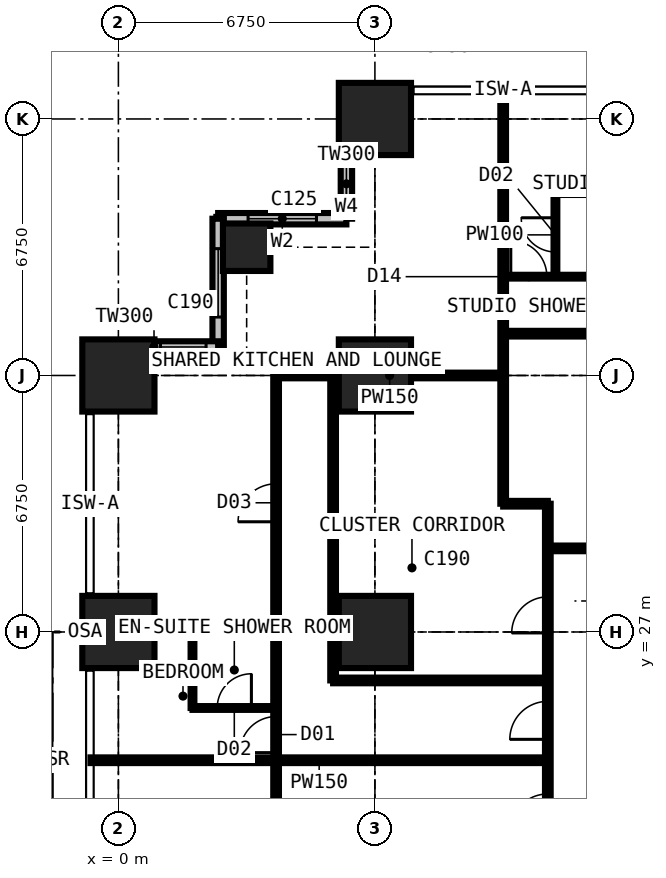
"""IFC4 building model, lengths in metres.
Left out: names, types, materials, properties, quantities, classifications, styles, units other than length and angle.
Written with IfcOpenShell. Run it as: python <this file> out.ifc"""

import sys

from ifc_helpers import new_model, si_unit, direction, frame, frame_2d, origin, origin_2d, place, context, subcontext, project, spatial, rectangle, extrude, element, fill, save


model = new_model("IFC4")
c1 = context("Model", 3, precision=1e-05, world=origin(), true_north=direction((0.0, 1.0)))
c2 = subcontext(c1, "Body", "Model", "MODEL_VIEW")
j1 = project(units=[si_unit("LENGTHUNIT", "METRE"), si_unit("PLANEANGLEUNIT", "RADIAN")], contexts=[c1])
p1 = place(None, origin())
s1 = spatial("IfcSite", under=j1, at=p1, CompositionType="ELEMENT")
p2 = place(p1, origin())
s2 = spatial("IfcBuilding", under=s1, at=p2, CompositionType="ELEMENT")
p3 = place(p2, frame((0.0, 0.0, 32.4)))
s3 = spatial("IfcBuildingStorey", under=s2, at=p3, CompositionType="ELEMENT", Elevation=32.4)
for number, where, z_axis, x_axis in (
    (1, (0.0, 27.0, 0.0), (0.0, 0.0, 1.0), (1.0, 0.0, 0.0)),
    (2, (0.0, 33.75, 0.0), (0.0, 0.0, 1.0), (1.0, 0.0, 0.0)),
):
    element("IfcColumn", number, at=place(p3, frame(where, z_axis=z_axis, x_axis=x_axis)), inside=s3, PredefinedType="COLUMN", context=c2, shape_type="SweptSolid", body=[
        extrude(rectangle(XDim=1.9, YDim=1.9, at=origin_2d()), origin(), (0.0, 0.0, 1.0), 3.6),
    ])
p4 = place(p3, frame((3.375, 37.125, 0.0), z_axis=(0.0, 0.0, 1.0), x_axis=(1.0, 0.0, 0.0)))
e3 = element("IfcColumn", 3, at=p4, inside=s3, PredefinedType="COLUMN", context=c2, shape_type="SweptSolid", body=[
    extrude(rectangle(XDim=1.25, YDim=1.25, at=origin_2d()), origin(), (0.0, 0.0, 1.0), 3.6),
])
for number, where, z_axis, x_axis in (
    (4, (6.75, 27.0, 0.0), (0.0, 0.0, 1.0), (1.0, 0.0, 0.0)),
    (5, (6.75, 33.75, 0.0), (0.0, 0.0, 1.0), (1.0, 0.0, 0.0)),
    (6, (6.75, 40.5, 0.0), (0.0, 0.0, 1.0), (1.0, 0.0, 0.0)),
):
    element("IfcColumn", number, at=place(p3, frame(where, z_axis=z_axis, x_axis=x_axis)), inside=s3, PredefinedType="COLUMN", context=c2, shape_type="SweptSolid", body=[
        extrude(rectangle(XDim=1.9, YDim=1.9, at=origin_2d()), origin(), (0.0, 0.0, 1.0), 3.6),
    ])
p5 = place(p3, frame((6.0, 41.25, 0.0), z_axis=(0.0, 0.0, 1.0), x_axis=(0.0, -1.0, 0.0)))
e7 = element("IfcWall", 7, at=p5, inside=s3, PredefinedType="SOLIDWALL", context=c2, shape_type="SweptSolid", body=[
    extrude(rectangle(XDim=3.375, YDim=0.3, at=frame_2d((1.688, 0.0))), origin(), (0.0, 0.0, 1.0), 3.375),
])
p6 = place(p5, frame((1.857, 0.0, 0.9)))
e8 = element("IfcOpeningElement", 8, at=p6, cuts=e7, PredefinedType="OPENING", context=c2, shape_type="SweptSolid", body=[
    extrude(rectangle(XDim=1.2, YDim=1.8, at=frame_2d((0.6, 0.9))), frame((0.0, 0.16, 0.0), z_axis=(0.0, -1.0, 0.0), x_axis=(1.0, 0.0, 0.0)), (0.0, 0.0, 1.0), 0.32),
])
p7 = place(p3, frame((6.0, 37.875, 0.0), z_axis=(0.0, 0.0, 1.0), x_axis=(-1.0, 0.0, 0.0)))
e9 = element("IfcWall", 9, at=p7, inside=s3, PredefinedType="SOLIDWALL", context=c2, shape_type="SweptSolid", body=[
    extrude(rectangle(XDim=3.375, YDim=0.3, at=frame_2d((1.688, 0.0))), origin(), (0.0, 0.0, 1.0), 3.375),
])
p8 = place(p7, frame((0.788, 0.0, 0.6)))
e10 = element("IfcOpeningElement", 10, at=p8, cuts=e9, PredefinedType="OPENING", context=c2, shape_type="SweptSolid", body=[
    extrude(rectangle(XDim=1.8, YDim=2.1, at=frame_2d((0.9, 1.05))), frame((0.0, 0.16, 0.0), z_axis=(0.0, -1.0, 0.0), x_axis=(1.0, 0.0, 0.0)), (0.0, 0.0, 1.0), 0.32),
])
p9 = place(p3, frame((2.625, 37.875, 0.0), z_axis=(0.0, 0.0, 1.0), x_axis=(0.0, -1.0, 0.0)))
e11 = element("IfcWall", 11, at=p9, inside=s3, PredefinedType="SOLIDWALL", context=c2, shape_type="SweptSolid", body=[
    extrude(rectangle(XDim=3.375, YDim=0.3, at=frame_2d((1.688, 0.0))), origin(), (0.0, 0.0, 1.0), 3.375),
])
p10 = place(p9, frame((0.788, 0.0, 0.6)))
e12 = element("IfcOpeningElement", 12, at=p10, cuts=e11, PredefinedType="OPENING", context=c2, shape_type="SweptSolid", body=[
    extrude(rectangle(XDim=1.8, YDim=2.1, at=frame_2d((0.9, 1.05))), frame((0.0, 0.16, 0.0), z_axis=(0.0, -1.0, 0.0), x_axis=(1.0, 0.0, 0.0)), (0.0, 0.0, 1.0), 0.32),
])
p11 = place(p3, frame((2.625, 34.5, 0.0), z_axis=(0.0, 0.0, 1.0), x_axis=(-1.0, 0.0, 0.0)))
e13 = element("IfcWall", 13, at=p11, inside=s3, PredefinedType="SOLIDWALL", context=c2, shape_type="SweptSolid", body=[
    extrude(rectangle(XDim=3.375, YDim=0.3, at=frame_2d((1.688, 0.0))), origin(), (0.0, 0.0, 1.0), 3.375),
])
p12 = place(p11, frame((0.317, 0.0, 0.9)))
e14 = element("IfcOpeningElement", 14, at=p12, cuts=e13, PredefinedType="OPENING", context=c2, shape_type="SweptSolid", body=[
    extrude(rectangle(XDim=1.2, YDim=1.8, at=frame_2d((0.6, 0.9))), frame((0.0, 0.16, 0.0), z_axis=(0.0, -1.0, 0.0), x_axis=(1.0, 0.0, 0.0)), (0.0, 0.0, 1.0), 0.32),
])
p13 = place(p3, frame((-0.734, 23.625, 0.0), z_axis=(0.0, 0.0, 1.0), x_axis=(1.0, 0.0, 0.0)))
e15 = element("IfcWall", 15, at=p13, inside=s3, PredefinedType="PARTITIONING", context=c2, shape_type="SweptSolid", body=[
    extrude(rectangle(XDim=12.034, YDim=0.15, at=frame_2d((6.017, 0.0))), origin(), (0.0, 0.0, 1.0), 3.375),
])
p14 = place(p3, frame((-0.734, 27.0, 0.0), z_axis=(0.0, 0.0, 1.0), x_axis=(1.0, 0.0, 0.0)))
e16 = element("IfcWall", 16, at=p14, inside=s3, PredefinedType="PARTITIONING", context=c2, shape_type="SweptSolid", body=[
    extrude(rectangle(XDim=4.884, YDim=0.15, at=frame_2d((2.442, 0.0))), origin(), (0.0, 0.0, 1.0), 2.61),
])
p15 = place(p3, frame((1.95, 25.0, 0.0), z_axis=(0.0, 0.0, 1.0), x_axis=(0.0, 1.0, 0.0)))
e17 = element("IfcWall", 17, at=p15, inside=s3, PredefinedType="PARTITIONING", context=c2, shape_type="SweptSolid", body=[
    extrude(rectangle(XDim=2.0, YDim=0.1, at=frame_2d((1.0, 0.0))), origin(), (0.0, 0.0, 1.0), 3.375),
])
p16 = place(p3, frame((1.95, 25.0, 0.0), z_axis=(0.0, 0.0, 1.0), x_axis=(1.0, 0.0, 0.0)))
e18 = element("IfcWall", 18, at=p16, inside=s3, PredefinedType="PARTITIONING", context=c2, shape_type="SweptSolid", body=[
    extrude(rectangle(XDim=2.2, YDim=0.1, at=frame_2d((1.1, 0.0))), origin(), (0.0, 0.0, 1.0), 3.375),
])
p17 = place(p16, frame((0.65, 0.0, 0.0)))
e19 = element("IfcOpeningElement", 19, at=p17, cuts=e18, PredefinedType="OPENING", context=c2, shape_type="SweptSolid", body=[
    extrude(rectangle(XDim=0.9, YDim=2.2, at=frame_2d((0.45, 1.1))), frame((0.0, 0.06, 0.0), z_axis=(0.0, -1.0, 0.0), x_axis=(1.0, 0.0, 0.0)), (0.0, 0.0, 1.0), 0.12),
])
p18 = place(p3, frame((4.15, 10.125, 0.0), z_axis=(0.0, 0.0, 1.0), x_axis=(0.0, 1.0, 0.0)))
e20 = element("IfcWall", 20, at=p18, inside=s3, PredefinedType="PARTITIONING", context=c2, shape_type="SweptSolid", body=[
    extrude(rectangle(XDim=23.625, YDim=0.15, at=frame_2d((11.812, 0.0))), origin(), (0.0, 0.0, 1.0), 3.375),
])
p19 = place(p18, frame((19.775, 0.0, 0.0)))
e21 = element("IfcOpeningElement", 21, at=p19, cuts=e20, PredefinedType="OPENING", context=c2, shape_type="SweptSolid", body=[
    extrude(rectangle(XDim=1.0, YDim=2.2, at=frame_2d((0.5, 1.1))), frame((0.0, 0.085, 0.0), z_axis=(0.0, -1.0, 0.0), x_axis=(1.0, 0.0, 0.0)), (0.0, 0.0, 1.0), 0.17),
])
p20 = place(p18, frame((13.7, 0.0, 0.0)))
e22 = element("IfcOpeningElement", 22, at=p20, cuts=e20, PredefinedType="OPENING", context=c2, shape_type="SweptSolid", body=[
    extrude(rectangle(XDim=0.95, YDim=2.2, at=frame_2d((0.475, 1.1))), frame((0.0, 0.085, 0.0), z_axis=(0.0, -1.0, 0.0), x_axis=(1.0, 0.0, 0.0)), (0.0, 0.0, 1.0), 0.17),
])
p21 = place(p18, frame((4.2, 0.0, 0.0)))
e23 = element("IfcOpeningElement", 23, at=p21, cuts=e20, PredefinedType="OPENING", context=c2, shape_type="SweptSolid", body=[
    extrude(rectangle(XDim=0.95, YDim=2.2, at=frame_2d((0.475, 1.1))), frame((0.0, 0.085, 0.0), z_axis=(0.0, -1.0, 0.0), x_axis=(1.0, 0.0, 0.0)), (0.0, 0.0, 1.0), 0.17),
])
p22 = place(p18, frame((10.95, 0.0, 0.0)))
e24 = element("IfcOpeningElement", 24, at=p22, cuts=e20, PredefinedType="OPENING", context=c2, shape_type="SweptSolid", body=[
    extrude(rectangle(XDim=0.95, YDim=2.2, at=frame_2d((0.475, 1.1))), frame((0.0, 0.085, 0.0), z_axis=(0.0, -1.0, 0.0), x_axis=(1.0, 0.0, 0.0)), (0.0, 0.0, 1.0), 0.17),
])
p23 = place(p3, frame((4.15, 33.75, 0.0), z_axis=(0.0, 0.0, 1.0), x_axis=(1.0, 0.0, 0.0)))
e25 = element("IfcWall", 25, at=p23, inside=s3, PredefinedType="PARTITIONING", context=c2, shape_type="SweptSolid", body=[
    extrude(rectangle(XDim=5.975, YDim=0.15, at=frame_2d((2.988, 0.0))), origin(), (0.0, 0.0, 1.0), 2.877),
])
p24 = place(p3, frame((5.65, 25.725, 0.0), z_axis=(0.0, 0.0, 1.0), x_axis=(0.0, 1.0, 0.0)))
e26 = element("IfcWall", 26, at=p24, inside=s3, PredefinedType="PARTITIONING", context=c2, shape_type="SweptSolid", body=[
    extrude(rectangle(XDim=8.025, YDim=0.15, at=frame_2d((4.012, 0.0))), origin(), (0.0, 0.0, 1.0), 3.375),
])
p25 = place(p3, frame((5.65, 25.725, 0.0), z_axis=(0.0, 0.0, 1.0), x_axis=(1.0, 0.0, 0.0)))
e27 = element("IfcWall", 27, at=p25, inside=s3, PredefinedType="PARTITIONING", context=c2, shape_type="SweptSolid", body=[
    extrude(rectangle(XDim=5.65, YDim=0.15, at=frame_2d((2.825, 0.0))), origin(), (0.0, 0.0, 1.0), 3.375),
])
p26 = place(p3, frame((10.125, 30.375, 0.0), z_axis=(0.0, 0.0, 1.0), x_axis=(0.0, 1.0, 0.0)))
e28 = element("IfcWall", 28, at=p26, inside=s3, PredefinedType="PARTITIONING", context=c2, shape_type="SweptSolid", body=[
    extrude(rectangle(XDim=10.859, YDim=0.15, at=frame_2d((5.429, 0.0))), origin(), (0.0, 0.0, 1.0), 3.375),
])
p27 = place(p3, frame((10.125, 30.375, 0.0), z_axis=(0.0, 0.0, 1.0), x_axis=(1.0, 0.0, 0.0)))
e29 = element("IfcWall", 29, at=p27, inside=s3, PredefinedType="PARTITIONING", context=c2, shape_type="SweptSolid", body=[
    extrude(rectangle(XDim=1.175, YDim=0.15, at=frame_2d((0.587, 0.0))), origin(), (0.0, 0.0, 1.0), 3.375),
])
p28 = place(p3, frame((10.125, 34.85, 0.0), z_axis=(0.0, 0.0, 1.0), x_axis=(1.0, 0.0, 0.0)))
e30 = element("IfcWall", 30, at=p28, inside=s3, PredefinedType="PARTITIONING", context=c2, shape_type="SweptSolid", body=[
    extrude(rectangle(XDim=10.762, YDim=0.15, at=frame_2d((5.381, 0.0))), origin(), (0.0, 0.0, 1.0), 3.375),
])
p29 = place(p28, frame((4.9, 0.0, 0.0)))
e31 = element("IfcOpeningElement", 31, at=p29, cuts=e30, PredefinedType="OPENING", context=c2, shape_type="SweptSolid", body=[
    extrude(rectangle(XDim=0.95, YDim=2.2, at=frame_2d((0.475, 1.1))), frame((0.0, 0.085, 0.0), z_axis=(0.0, -1.0, 0.0), x_axis=(1.0, 0.0, 0.0)), (0.0, 0.0, 1.0), 0.17),
])
p30 = place(p3, frame((10.125, 36.35, 0.0), z_axis=(0.0, 0.0, 1.0), x_axis=(1.0, 0.0, 0.0)))
e32 = element("IfcWall", 32, at=p30, inside=s3, PredefinedType="PARTITIONING", context=c2, shape_type="SweptSolid", body=[
    extrude(rectangle(XDim=23.625, YDim=0.1, at=frame_2d((11.812, 0.0))), origin(), (0.0, 0.0, 1.0), 3.375),
])
p31 = place(p30, frame((20.5, 0.0, 0.0)))
e33 = element("IfcOpeningElement", 33, at=p31, cuts=e32, PredefinedType="OPENING", context=c2, shape_type="SweptSolid", body=[
    extrude(rectangle(XDim=0.95, YDim=2.2, at=frame_2d((0.475, 1.1))), frame((0.0, 0.06, 0.0), z_axis=(0.0, -1.0, 0.0), x_axis=(1.0, 0.0, 0.0)), (0.0, 0.0, 1.0), 0.12),
])
p32 = place(p30, frame((17.125, 0.0, 0.0)))
e34 = element("IfcOpeningElement", 34, at=p32, cuts=e32, PredefinedType="OPENING", context=c2, shape_type="SweptSolid", body=[
    extrude(rectangle(XDim=0.95, YDim=2.2, at=frame_2d((0.475, 1.1))), frame((0.0, 0.06, 0.0), z_axis=(0.0, -1.0, 0.0), x_axis=(1.0, 0.0, 0.0)), (0.0, 0.0, 1.0), 0.12),
])
p33 = place(p30, frame((13.7, 0.0, 0.0)))
e35 = element("IfcOpeningElement", 35, at=p33, cuts=e32, PredefinedType="OPENING", context=c2, shape_type="SweptSolid", body=[
    extrude(rectangle(XDim=0.95, YDim=2.2, at=frame_2d((0.475, 1.1))), frame((0.0, 0.06, 0.0), z_axis=(0.0, -1.0, 0.0), x_axis=(1.0, 0.0, 0.0)), (0.0, 0.0, 1.0), 0.12),
])
p34 = place(p30, frame((0.2, 0.0, 0.0)))
e36 = element("IfcOpeningElement", 36, at=p34, cuts=e32, PredefinedType="OPENING", context=c2, shape_type="SweptSolid", body=[
    extrude(rectangle(XDim=0.95, YDim=2.2, at=frame_2d((0.475, 1.1))), frame((0.0, 0.06, 0.0), z_axis=(0.0, -1.0, 0.0), x_axis=(1.0, 0.0, 0.0)), (0.0, 0.0, 1.0), 0.12),
])
p35 = place(p30, frame((3.625, 0.0, 0.0)))
e37 = element("IfcOpeningElement", 37, at=p35, cuts=e32, PredefinedType="OPENING", context=c2, shape_type="SweptSolid", body=[
    extrude(rectangle(XDim=0.95, YDim=2.2, at=frame_2d((0.475, 1.1))), frame((0.0, 0.06, 0.0), z_axis=(0.0, -1.0, 0.0), x_axis=(1.0, 0.0, 0.0)), (0.0, 0.0, 1.0), 0.12),
])
p36 = place(p30, frame((7.0, 0.0, 0.0)))
e38 = element("IfcOpeningElement", 38, at=p36, cuts=e32, PredefinedType="OPENING", context=c2, shape_type="SweptSolid", body=[
    extrude(rectangle(XDim=0.95, YDim=2.2, at=frame_2d((0.475, 1.1))), frame((0.0, 0.06, 0.0), z_axis=(0.0, -1.0, 0.0), x_axis=(1.0, 0.0, 0.0)), (0.0, 0.0, 1.0), 0.12),
])
p37 = place(p30, frame((10.375, 0.0, 0.0)))
e39 = element("IfcOpeningElement", 39, at=p37, cuts=e32, PredefinedType="OPENING", context=c2, shape_type="SweptSolid", body=[
    extrude(rectangle(XDim=0.95, YDim=2.2, at=frame_2d((0.475, 1.1))), frame((0.0, 0.06, 0.0), z_axis=(0.0, -1.0, 0.0), x_axis=(1.0, 0.0, 0.0)), (0.0, 0.0, 1.0), 0.12),
])
p38 = place(p3, frame((11.3, 11.3, 0.0), z_axis=(0.0, 0.0, 1.0), x_axis=(0.0, 1.0, 0.0)))
e40 = element("IfcWall", 40, at=p38, inside=s3, PredefinedType="PARTITIONING", context=c2, shape_type="SweptSolid", body=[
    extrude(rectangle(XDim=19.075, YDim=0.15, at=frame_2d((9.538, 0.0))), origin(), (0.0, 0.0, 1.0), 3.375),
])
p39 = place(p38, frame((12.875, 0.0, 0.0)))
e41 = element("IfcOpeningElement", 41, at=p39, cuts=e40, PredefinedType="OPENING", context=c2, shape_type="SweptSolid", body=[
    extrude(rectangle(XDim=1.0, YDim=2.2, at=frame_2d((0.5, 1.1))), frame((0.0, 0.085, 0.0), z_axis=(0.0, -1.0, 0.0), x_axis=(1.0, 0.0, 0.0)), (0.0, 0.0, 1.0), 0.17),
])
p40 = place(p38, frame((10.438, 0.0, 0.0)))
e42 = element("IfcOpeningElement", 42, at=p40, cuts=e40, PredefinedType="OPENING", context=c2, shape_type="SweptSolid", body=[
    extrude(rectangle(XDim=1.0, YDim=2.2, at=frame_2d((0.5, 1.1))), frame((0.0, 0.085, 0.0), z_axis=(0.0, -1.0, 0.0), x_axis=(1.0, 0.0, 0.0)), (0.0, 0.0, 1.0), 0.17),
])
p41 = place(p38, frame((15.675, 0.0, 0.0)))
e43 = element("IfcOpeningElement", 43, at=p41, cuts=e40, PredefinedType="OPENING", context=c2, shape_type="SweptSolid", body=[
    extrude(rectangle(XDim=0.95, YDim=2.2, at=frame_2d((0.475, 1.1))), frame((0.0, 0.085, 0.0), z_axis=(0.0, -1.0, 0.0), x_axis=(1.0, 0.0, 0.0)), (0.0, 0.0, 1.0), 0.17),
])
p42 = place(p3, frame((11.3, 29.2, 0.0), z_axis=(0.0, 0.0, 1.0), x_axis=(1.0, 0.0, 0.0)))
e44 = element("IfcWall", 44, at=p42, inside=s3, PredefinedType="PARTITIONING", context=c2, shape_type="SweptSolid", body=[
    extrude(rectangle(XDim=19.075, YDim=0.15, at=frame_2d((9.538, 0.0))), origin(), (0.0, 0.0, 1.0), 3.375),
])
p43 = place(p42, frame((12.875, 0.0, 0.0)))
e45 = element("IfcOpeningElement", 45, at=p43, cuts=e44, PredefinedType="OPENING", context=c2, shape_type="SweptSolid", body=[
    extrude(rectangle(XDim=1.0, YDim=2.2, at=frame_2d((0.5, 1.1))), frame((0.0, 0.085, 0.0), z_axis=(0.0, -1.0, 0.0), x_axis=(1.0, 0.0, 0.0)), (0.0, 0.0, 1.0), 0.17),
])
p44 = place(p42, frame((10.438, 0.0, 0.0)))
e46 = element("IfcOpeningElement", 46, at=p44, cuts=e44, PredefinedType="OPENING", context=c2, shape_type="SweptSolid", body=[
    extrude(rectangle(XDim=1.0, YDim=2.2, at=frame_2d((0.5, 1.1))), frame((0.0, 0.085, 0.0), z_axis=(0.0, -1.0, 0.0), x_axis=(1.0, 0.0, 0.0)), (0.0, 0.0, 1.0), 0.17),
])
p45 = place(p42, frame((15.675, 0.0, 0.0)))
e47 = element("IfcOpeningElement", 47, at=p45, cuts=e44, PredefinedType="OPENING", context=c2, shape_type="SweptSolid", body=[
    extrude(rectangle(XDim=0.95, YDim=2.2, at=frame_2d((0.475, 1.1))), frame((0.0, 0.085, 0.0), z_axis=(0.0, -1.0, 0.0), x_axis=(1.0, 0.0, 0.0)), (0.0, 0.0, 1.0), 0.17),
])
p46 = place(p3, frame((11.5, 36.35, 0.0), z_axis=(0.0, 0.0, 1.0), x_axis=(0.0, 1.0, 0.0)))
e48 = element("IfcWall", 48, at=p46, inside=s3, PredefinedType="PARTITIONING", context=c2, shape_type="SweptSolid", body=[
    extrude(rectangle(XDim=2.2, YDim=0.1, at=frame_2d((1.1, 0.0))), origin(), (0.0, 0.0, 1.0), 3.375),
])
p47 = place(p46, frame((0.65, 0.0, 0.0)))
e49 = element("IfcOpeningElement", 49, at=p47, cuts=e48, PredefinedType="OPENING", context=c2, shape_type="SweptSolid", body=[
    extrude(rectangle(XDim=0.9, YDim=2.2, at=frame_2d((0.45, 1.1))), frame((0.0, 0.06, 0.0), z_axis=(0.0, -1.0, 0.0), x_axis=(1.0, 0.0, 0.0)), (0.0, 0.0, 1.0), 0.12),
])
p48 = place(p3, frame((11.5, 38.55, 0.0), z_axis=(0.0, 0.0, 1.0), x_axis=(1.0, 0.0, 0.0)))
e50 = element("IfcWall", 50, at=p48, inside=s3, PredefinedType="PARTITIONING", context=c2, shape_type="SweptSolid", body=[
    extrude(rectangle(XDim=2.0, YDim=0.1, at=frame_2d((1.0, 0.0))), origin(), (0.0, 0.0, 1.0), 3.375),
])
p49 = place(p6, origin())
e51 = element("IfcWindow", 51, at=p49, inside=s3, PartitioningType="SINGLE_PANEL", PredefinedType="WINDOW", context=c2, shape_type="SweptSolid", body=[
    extrude(rectangle(XDim=1.2, YDim=1.8, at=frame_2d((0.6, 0.9))), frame((0.0, 0.03, 0.0), z_axis=(0.0, -1.0, 0.0), x_axis=(1.0, 0.0, 0.0)), (0.0, 0.0, 1.0), 0.06),
])
fill(e8, e51)
p50 = place(p8, origin())
e52 = element("IfcWindow", 52, at=p50, inside=s3, PartitioningType="SINGLE_PANEL", PredefinedType="WINDOW", context=c2, shape_type="SweptSolid", body=[
    extrude(rectangle(XDim=1.8, YDim=2.1, at=frame_2d((0.9, 1.05))), frame((0.0, 0.03, 0.0), z_axis=(0.0, -1.0, 0.0), x_axis=(1.0, 0.0, 0.0)), (0.0, 0.0, 1.0), 0.06),
])
fill(e10, e52)
p51 = place(p10, origin())
e53 = element("IfcWindow", 53, at=p51, inside=s3, PartitioningType="SINGLE_PANEL", PredefinedType="WINDOW", context=c2, shape_type="SweptSolid", body=[
    extrude(rectangle(XDim=1.8, YDim=2.1, at=frame_2d((0.9, 1.05))), frame((0.0, 0.03, 0.0), z_axis=(0.0, -1.0, 0.0), x_axis=(1.0, 0.0, 0.0)), (0.0, 0.0, 1.0), 0.06),
])
fill(e12, e53)
p52 = place(p12, origin())
e54 = element("IfcWindow", 54, at=p52, inside=s3, PartitioningType="SINGLE_PANEL", PredefinedType="WINDOW", context=c2, shape_type="SweptSolid", body=[
    extrude(rectangle(XDim=1.2, YDim=1.8, at=frame_2d((0.6, 0.9))), frame((0.0, 0.03, 0.0), z_axis=(0.0, -1.0, 0.0), x_axis=(1.0, 0.0, 0.0)), (0.0, 0.0, 1.0), 0.06),
])
fill(e14, e54)
p53 = place(p34, origin())
e55 = element("IfcDoor", 55, at=p53, inside=s3, OperationType="SINGLE_SWING_LEFT", PredefinedType="DOOR", context=c2, shape_type="SweptSolid", body=[
    extrude(rectangle(XDim=0.95, YDim=2.2, at=frame_2d((0.475, 1.1))), frame((0.0, 0.025, 0.0), z_axis=(0.0, -1.0, 0.0), x_axis=(1.0, 0.0, 0.0)), (0.0, 0.0, 1.0), 0.05),
])
fill(e36, e55)
p54 = place(p47, origin())
e56 = element("IfcDoor", 56, at=p54, inside=s3, OperationType="SINGLE_SWING_RIGHT", PredefinedType="DOOR", context=c2, shape_type="SweptSolid", body=[
    extrude(rectangle(XDim=0.9, YDim=2.2, at=frame_2d((0.45, 1.1))), frame((0.0, 0.025, 0.0), z_axis=(0.0, -1.0, 0.0), x_axis=(1.0, 0.0, 0.0)), (0.0, 0.0, 1.0), 0.05),
])
fill(e49, e56)
p55 = place(p19, origin())
e57 = element("IfcDoor", 57, at=p55, inside=s3, OperationType="SINGLE_SWING_LEFT", PredefinedType="DOOR", context=c2, shape_type="SweptSolid", body=[
    extrude(rectangle(XDim=1.0, YDim=2.2, at=frame_2d((0.5, 1.1))), frame((0.0, 0.025, 0.0), z_axis=(0.0, -1.0, 0.0), x_axis=(1.0, 0.0, 0.0)), (0.0, 0.0, 1.0), 0.05),
])
fill(e21, e57)
p56 = place(p20, origin())
e58 = element("IfcDoor", 58, at=p56, inside=s3, OperationType="SINGLE_SWING_LEFT", PredefinedType="DOOR", context=c2, shape_type="SweptSolid", body=[
    extrude(rectangle(XDim=0.95, YDim=2.2, at=frame_2d((0.475, 1.1))), frame((0.0, 0.025, 0.0), z_axis=(0.0, -1.0, 0.0), x_axis=(1.0, 0.0, 0.0)), (0.0, 0.0, 1.0), 0.05),
])
fill(e22, e58)
p57 = place(p17, origin())
e59 = element("IfcDoor", 59, at=p57, inside=s3, OperationType="SINGLE_SWING_RIGHT", PredefinedType="DOOR", context=c2, shape_type="SweptSolid", body=[
    extrude(rectangle(XDim=0.9, YDim=2.2, at=frame_2d((0.45, 1.1))), frame((0.0, 0.025, 0.0), z_axis=(0.0, -1.0, 0.0), x_axis=(1.0, 0.0, 0.0)), (0.0, 0.0, 1.0), 0.05),
])
fill(e19, e59)
p58 = place(p39, origin())
e60 = element("IfcDoor", 60, at=p58, inside=s3, OperationType="SINGLE_SWING_LEFT", PredefinedType="DOOR", context=c2, shape_type="SweptSolid", body=[
    extrude(rectangle(XDim=1.0, YDim=2.2, at=frame_2d((0.5, 1.1))), frame((0.0, 0.025, 0.0), z_axis=(0.0, -1.0, 0.0), x_axis=(1.0, 0.0, 0.0)), (0.0, 0.0, 1.0), 0.05),
])
fill(e41, e60)
p59 = place(p40, origin())
e61 = element("IfcDoor", 61, at=p59, inside=s3, OperationType="SINGLE_SWING_LEFT", PredefinedType="DOOR", context=c2, shape_type="SweptSolid", body=[
    extrude(rectangle(XDim=1.0, YDim=2.2, at=frame_2d((0.5, 1.1))), frame((0.0, 0.025, 0.0), z_axis=(0.0, -1.0, 0.0), x_axis=(1.0, 0.0, 0.0)), (0.0, 0.0, 1.0), 0.05),
])
fill(e42, e61)
p60 = place(p41, origin())
e62 = element("IfcDoor", 62, at=p60, inside=s3, OperationType="SINGLE_SWING_LEFT", PredefinedType="DOOR", context=c2, shape_type="SweptSolid", body=[
    extrude(rectangle(XDim=0.95, YDim=2.2, at=frame_2d((0.475, 1.1))), frame((0.0, 0.025, 0.0), z_axis=(0.0, -1.0, 0.0), x_axis=(1.0, 0.0, 0.0)), (0.0, 0.0, 1.0), 0.05),
])
fill(e43, e62)
save(model, sys.argv[1])
